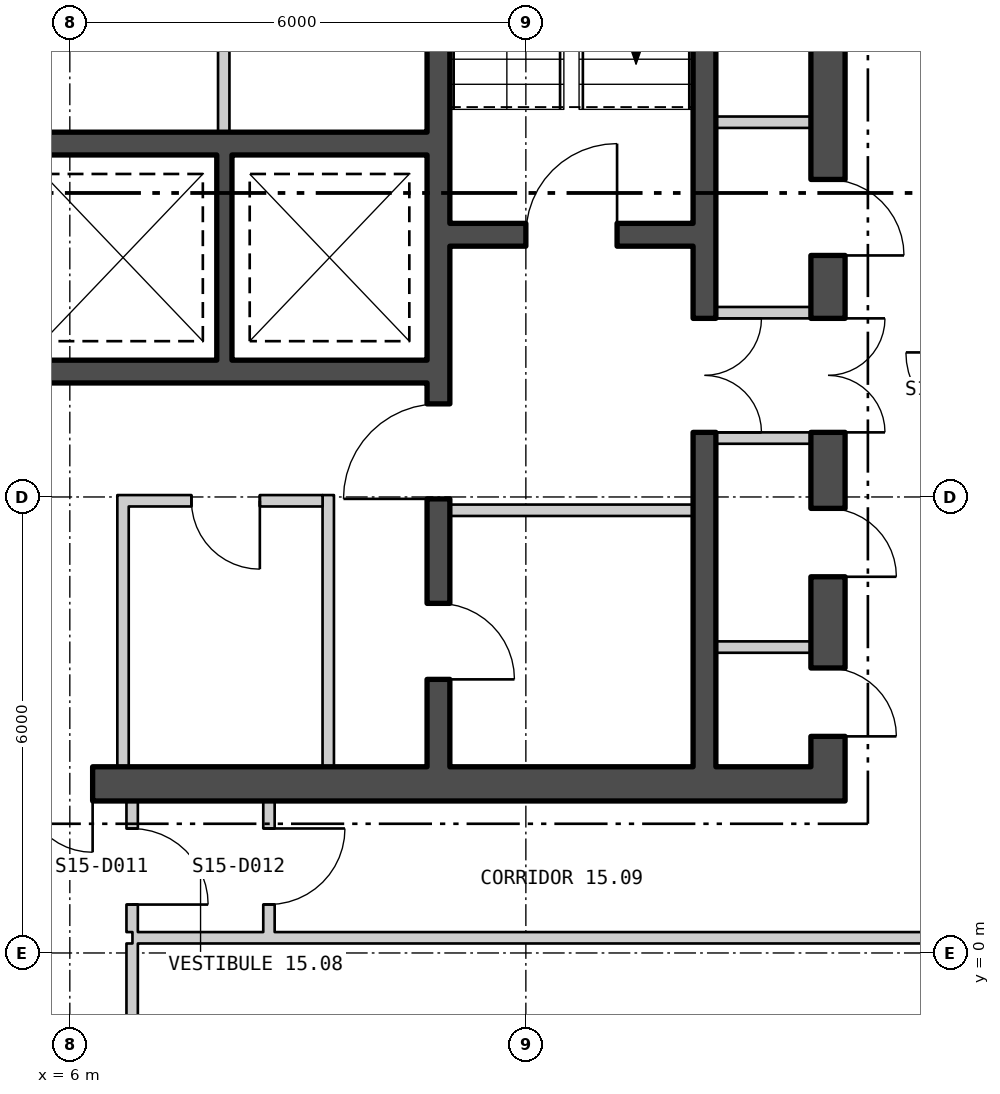
"""IFC4 building model, lengths in metres.
Left out: names, types, materials, properties, quantities, classifications, styles, units other than length and angle.
Written with IfcOpenShell. Run it as: python <this file> out.ifc"""

import sys

from ifc_helpers import new_model, si_unit, direction, frame, frame_2d, origin, place, context, subcontext, project, spatial, polyline, rectangle, outline, extrude, element, fill, save


model = new_model("IFC4")
c1 = context("Model", 3, precision=1e-05, world=origin(), true_north=direction((0.0, 1.0)))
c2 = subcontext(c1, "Body", "Model", "MODEL_VIEW")
j1 = project(units=[si_unit("LENGTHUNIT", "METRE"), si_unit("PLANEANGLEUNIT", "RADIAN")], contexts=[c1])
p1 = place(None, origin())
s1 = spatial("IfcSite", under=j1, at=p1, CompositionType="ELEMENT")
p2 = place(p1, origin())
s2 = spatial("IfcBuilding", under=s1, at=p2, CompositionType="ELEMENT")
p3 = place(p2, frame((0.0, 0.0, 204.3)))
s3 = spatial("IfcBuildingStorey", under=s2, at=p3, CompositionType="ELEMENT", Elevation=204.3)
p4 = place(p3, frame((3.515, -25.726, -0.18), z_axis=(0.0, 0.0, 1.0), x_axis=(0.499999764979, 0.866025539474, 0.0)))
e1 = element("IfcWall", 1, at=p4, inside=s3, PredefinedType="SOLIDWALL", context=c2, shape_type="SweptSolid", body=[
    extrude(outline(polyline([(-0.13, -0.225), (45.87, -0.225), (45.61, 0.225), (0.13, 0.225), (-0.13, -0.225)])), origin(), (0.0, 0.0, 1.0), 3.68),
])
p5 = place(p4, frame((1.424, 0.0, 1.08)))
e2 = element("IfcOpeningElement", 2, at=p5, cuts=e1, PredefinedType="OPENING", context=c2, shape_type="SweptSolid", body=[
    extrude(rectangle(XDim=2.4, YDim=2.0, at=frame_2d((1.2, 1.0))), frame((0.0, 0.235, 0.0), z_axis=(0.0, -1.0, 0.0), x_axis=(1.0, 0.0, 0.0)), (0.0, 0.0, 1.0), 0.47),
])
p6 = place(p4, frame((5.893, 0.0, 1.08)))
e3 = element("IfcOpeningElement", 3, at=p6, cuts=e1, PredefinedType="OPENING", context=c2, shape_type="SweptSolid", body=[
    extrude(rectangle(XDim=2.4, YDim=2.0, at=frame_2d((1.2, 1.0))), frame((0.0, 0.235, 0.0), z_axis=(0.0, -1.0, 0.0), x_axis=(1.0, 0.0, 0.0)), (0.0, 0.0, 1.0), 0.47),
])
p7 = place(p4, frame((10.401, 0.0, 1.08)))
e4 = element("IfcOpeningElement", 4, at=p7, cuts=e1, PredefinedType="OPENING", context=c2, shape_type="SweptSolid", body=[
    extrude(rectangle(XDim=2.4, YDim=2.0, at=frame_2d((1.2, 1.0))), frame((0.0, 0.235, 0.0), z_axis=(0.0, -1.0, 0.0), x_axis=(1.0, 0.0, 0.0)), (0.0, 0.0, 1.0), 0.47),
])
p8 = place(p4, frame((14.909, 0.0, 1.08)))
e5 = element("IfcOpeningElement", 5, at=p8, cuts=e1, PredefinedType="OPENING", context=c2, shape_type="SweptSolid", body=[
    extrude(rectangle(XDim=2.4, YDim=2.0, at=frame_2d((1.2, 1.0))), frame((0.0, 0.235, 0.0), z_axis=(0.0, -1.0, 0.0), x_axis=(1.0, 0.0, 0.0)), (0.0, 0.0, 1.0), 0.47),
])
p9 = place(p4, frame((19.416, 0.0, 1.08)))
e6 = element("IfcOpeningElement", 6, at=p9, cuts=e1, PredefinedType="OPENING", context=c2, shape_type="SweptSolid", body=[
    extrude(rectangle(XDim=2.4, YDim=2.0, at=frame_2d((1.2, 1.0))), frame((0.0, 0.235, 0.0), z_axis=(0.0, -1.0, 0.0), x_axis=(1.0, 0.0, 0.0)), (0.0, 0.0, 1.0), 0.47),
])
p10 = place(p4, frame((23.924, 0.0, 1.08)))
e7 = element("IfcOpeningElement", 7, at=p10, cuts=e1, PredefinedType="OPENING", context=c2, shape_type="SweptSolid", body=[
    extrude(rectangle(XDim=2.4, YDim=2.0, at=frame_2d((1.2, 1.0))), frame((0.0, 0.235, 0.0), z_axis=(0.0, -1.0, 0.0), x_axis=(1.0, 0.0, 0.0)), (0.0, 0.0, 1.0), 0.47),
])
p11 = place(p4, frame((28.431, 0.0, 1.08)))
e8 = element("IfcOpeningElement", 8, at=p11, cuts=e1, PredefinedType="OPENING", context=c2, shape_type="SweptSolid", body=[
    extrude(rectangle(XDim=2.4, YDim=2.0, at=frame_2d((1.2, 1.0))), frame((0.0, 0.235, 0.0), z_axis=(0.0, -1.0, 0.0), x_axis=(1.0, 0.0, 0.0)), (0.0, 0.0, 1.0), 0.47),
])
p12 = place(p4, frame((32.939, 0.0, 1.08)))
e9 = element("IfcOpeningElement", 9, at=p12, cuts=e1, PredefinedType="OPENING", context=c2, shape_type="SweptSolid", body=[
    extrude(rectangle(XDim=2.4, YDim=2.0, at=frame_2d((1.2, 1.0))), frame((0.0, 0.235, 0.0), z_axis=(0.0, -1.0, 0.0), x_axis=(1.0, 0.0, 0.0)), (0.0, 0.0, 1.0), 0.47),
])
p13 = place(p4, frame((37.447, 0.0, 1.08)))
e10 = element("IfcOpeningElement", 10, at=p13, cuts=e1, PredefinedType="OPENING", context=c2, shape_type="SweptSolid", body=[
    extrude(rectangle(XDim=2.4, YDim=2.0, at=frame_2d((1.2, 1.0))), frame((0.0, 0.235, 0.0), z_axis=(0.0, -1.0, 0.0), x_axis=(1.0, 0.0, 0.0)), (0.0, 0.0, 1.0), 0.47),
])
p14 = place(p4, frame((41.916, 0.0, 1.08)))
e11 = element("IfcOpeningElement", 11, at=p14, cuts=e1, PredefinedType="OPENING", context=c2, shape_type="SweptSolid", body=[
    extrude(rectangle(XDim=2.4, YDim=2.0, at=frame_2d((1.2, 1.0))), frame((0.0, 0.235, 0.0), z_axis=(0.0, -1.0, 0.0), x_axis=(1.0, 0.0, 0.0)), (0.0, 0.0, 1.0), 0.47),
])
p15 = place(p3, frame((-16.2, 2.225, 0.0), z_axis=(0.0, 0.0, 1.0), x_axis=(1.0, 0.0, 0.0)))
e12 = element("IfcWall", 12, at=p15, inside=s3, PredefinedType="SHEAR", context=c2, shape_type="SweptSolid", body=[
    extrude(rectangle(XDim=32.4, YDim=0.45, at=frame_2d((16.2, 0.0))), origin(), (0.0, 0.0, 1.0), 3.7),
])
p16 = place(p15, frame((10.7, 0.0, 0.0)))
e13 = element("IfcOpeningElement", 13, at=p16, cuts=e12, PredefinedType="OPENING", context=c2, shape_type="SweptSolid", body=[
    extrude(rectangle(XDim=1.8, YDim=2.4, at=frame_2d((0.9, 1.2))), frame((0.0, 0.235, 0.0), z_axis=(0.0, -1.0, 0.0), x_axis=(1.0, 0.0, 0.0)), (0.0, 0.0, 1.0), 0.47),
])
p17 = place(p15, frame((20.7, 0.0, 0.0)))
e14 = element("IfcOpeningElement", 14, at=p17, cuts=e12, PredefinedType="OPENING", context=c2, shape_type="SweptSolid", body=[
    extrude(rectangle(XDim=1.8, YDim=2.4, at=frame_2d((0.9, 1.2))), frame((0.0, 0.235, 0.0), z_axis=(0.0, -1.0, 0.0), x_axis=(1.0, 0.0, 0.0)), (0.0, 0.0, 1.0), 0.47),
])
p18 = place(p3, frame((15.975, 2.45, 0.0), z_axis=(0.0, 0.0, 1.0), x_axis=(0.0, 1.0, 0.0)))
e15 = element("IfcWall", 15, at=p18, inside=s3, PredefinedType="SHEAR", context=c2, shape_type="SweptSolid", body=[
    extrude(rectangle(XDim=15.1, YDim=0.45, at=frame_2d((7.55, 0.0))), origin(), (0.0, 0.0, 1.0), 3.7),
])
p19 = place(p18, frame((4.4, 0.0, 0.0)))
e16 = element("IfcOpeningElement", 16, at=p19, cuts=e15, PredefinedType="OPENING", context=c2, shape_type="SweptSolid", body=[
    extrude(rectangle(XDim=1.5, YDim=2.1, at=frame_2d((0.75, 1.05))), frame((0.0, 0.235, 0.0), z_axis=(0.0, -1.0, 0.0), x_axis=(1.0, 0.0, 0.0)), (0.0, 0.0, 1.0), 0.47),
])
p20 = place(p18, frame((0.4, 0.0, 0.0)))
e17 = element("IfcOpeningElement", 17, at=p20, cuts=e15, PredefinedType="OPENING", context=c2, shape_type="SweptSolid", body=[
    extrude(rectangle(XDim=0.9, YDim=2.1, at=frame_2d((0.45, 1.05))), frame((0.0, 0.235, 0.0), z_axis=(0.0, -1.0, 0.0), x_axis=(1.0, 0.0, 0.0)), (0.0, 0.0, 1.0), 0.47),
])
p21 = place(p18, frame((2.5, 0.0, 0.0)))
e18 = element("IfcOpeningElement", 18, at=p21, cuts=e15, PredefinedType="OPENING", context=c2, shape_type="SweptSolid", body=[
    extrude(rectangle(XDim=0.9, YDim=2.1, at=frame_2d((0.45, 1.05))), frame((0.0, 0.235, 0.0), z_axis=(0.0, -1.0, 0.0), x_axis=(1.0, 0.0, 0.0)), (0.0, 0.0, 1.0), 0.47),
])
p22 = place(p18, frame((6.728, 0.0, 0.0)))
e19 = element("IfcOpeningElement", 19, at=p22, cuts=e15, PredefinedType="OPENING", context=c2, shape_type="SweptSolid", body=[
    extrude(rectangle(XDim=1.0, YDim=2.1, at=frame_2d((0.5, 1.05))), frame((0.0, 0.235, 0.0), z_axis=(0.0, -1.0, 0.0), x_axis=(1.0, 0.0, 0.0)), (0.0, 0.0, 1.0), 0.47),
])
p23 = place(p18, frame((10.293, 0.0, 0.0)))
e20 = element("IfcOpeningElement", 20, at=p23, cuts=e15, PredefinedType="OPENING", context=c2, shape_type="SweptSolid", body=[
    extrude(rectangle(XDim=0.9, YDim=2.1, at=frame_2d((0.45, 1.05))), frame((0.0, 0.235, 0.0), z_axis=(0.0, -1.0, 0.0), x_axis=(1.0, 0.0, 0.0)), (0.0, 0.0, 1.0), 0.47),
])
p24 = place(p18, frame((13.64, 0.0, 0.0)))
e21 = element("IfcOpeningElement", 21, at=p24, cuts=e15, PredefinedType="OPENING", context=c2, shape_type="SweptSolid", body=[
    extrude(rectangle(XDim=0.9, YDim=2.1, at=frame_2d((0.45, 1.05))), frame((0.0, 0.235, 0.0), z_axis=(0.0, -1.0, 0.0), x_axis=(1.0, 0.0, 0.0)), (0.0, 0.0, 1.0), 0.47),
])
p25 = place(p3, frame((10.85, 2.45, 0.0), z_axis=(0.0, 0.0, 1.0), x_axis=(0.0, 1.0, 0.0)))
e22 = element("IfcWall", 22, at=p25, inside=s3, PredefinedType="SHEAR", context=c2, shape_type="SweptSolid", body=[
    extrude(rectangle(XDim=15.1, YDim=0.3, at=frame_2d((7.55, 0.0))), origin(), (0.0, 0.0, 1.0), 3.7),
])
p26 = place(p25, frame((3.525, 0.0, 0.0)))
e23 = element("IfcOpeningElement", 23, at=p26, cuts=e22, PredefinedType="OPENING", context=c2, shape_type="SweptSolid", body=[
    extrude(rectangle(XDim=1.25, YDim=2.1, at=frame_2d((0.625, 1.05))), frame((0.0, 0.16, 0.0), z_axis=(0.0, -1.0, 0.0), x_axis=(1.0, 0.0, 0.0)), (0.0, 0.0, 1.0), 0.32),
])
p27 = place(p25, frame((1.15, 0.0, 0.0)))
e24 = element("IfcOpeningElement", 24, at=p27, cuts=e22, PredefinedType="OPENING", context=c2, shape_type="SweptSolid", body=[
    extrude(rectangle(XDim=1.0, YDim=2.1, at=frame_2d((0.5, 1.05))), frame((0.0, 0.16, 0.0), z_axis=(0.0, -1.0, 0.0), x_axis=(1.0, 0.0, 0.0)), (0.0, 0.0, 1.0), 0.32),
])
p28 = place(p3, frame((14.35, 2.45, 0.0), z_axis=(0.0, 0.0, 1.0), x_axis=(0.0, 1.0, 0.0)))
e25 = element("IfcWall", 25, at=p28, inside=s3, PredefinedType="SHEAR", context=c2, shape_type="SweptSolid", body=[
    extrude(rectangle(XDim=15.1, YDim=0.3, at=frame_2d((7.55, 0.0))), origin(), (0.0, 0.0, 1.0), 3.7),
])
p29 = place(p28, frame((4.4, 0.0, 0.0)))
e26 = element("IfcOpeningElement", 26, at=p29, cuts=e25, PredefinedType="OPENING", context=c2, shape_type="SweptSolid", body=[
    extrude(rectangle(XDim=1.5, YDim=2.1, at=frame_2d((0.75, 1.05))), frame((0.0, 0.16, 0.0), z_axis=(0.0, -1.0, 0.0), x_axis=(1.0, 0.0, 0.0)), (0.0, 0.0, 1.0), 0.32),
])
p30 = place(p3, frame((11.0, 9.45, 0.0), z_axis=(0.0, 0.0, 1.0), x_axis=(1.0, 0.0, 0.0)))
e27 = element("IfcWall", 27, at=p30, inside=s3, PredefinedType="SHEAR", context=c2, shape_type="SweptSolid", body=[
    extrude(rectangle(XDim=3.2, YDim=0.3, at=frame_2d((1.6, 0.0))), origin(), (0.0, 0.0, 1.0), 3.7),
])
p31 = place(p30, frame((1.0, 0.0, 0.0)))
e28 = element("IfcOpeningElement", 28, at=p31, cuts=e27, PredefinedType="OPENING", context=c2, shape_type="SweptSolid", body=[
    extrude(rectangle(XDim=1.2, YDim=2.1, at=frame_2d((0.6, 1.05))), frame((0.0, 0.16, 0.0), z_axis=(0.0, -1.0, 0.0), x_axis=(1.0, 0.0, 0.0)), (0.0, 0.0, 1.0), 0.32),
])
p32 = place(p3, frame((2.6, 10.65, 0.0), z_axis=(0.0, 0.0, 1.0), x_axis=(1.0, 0.0, 0.0)))
e29 = element("IfcWall", 29, at=p32, inside=s3, PredefinedType="SHEAR", context=c2, shape_type="SweptSolid", body=[
    extrude(rectangle(XDim=8.1, YDim=0.3, at=frame_2d((4.05, 0.0))), origin(), (0.0, 0.0, 1.0), 3.7),
])
p33 = place(p32, frame((0.933, 0.0, 0.0)))
e30 = element("IfcOpeningElement", 30, at=p33, cuts=e29, PredefinedType="OPENING", context=c2, shape_type="SweptSolid", body=[
    extrude(rectangle(XDim=1.0, YDim=2.1, at=frame_2d((0.5, 1.05))), frame((0.0, 0.16, 0.0), z_axis=(0.0, -1.0, 0.0), x_axis=(1.0, 0.0, 0.0)), (0.0, 0.0, 1.0), 0.32),
])
p34 = place(p3, frame((2.6, 7.65, 0.0), z_axis=(0.0, 0.0, 1.0), x_axis=(1.0, 0.0, 0.0)))
e31 = element("IfcWall", 31, at=p34, inside=s3, PredefinedType="SHEAR", context=c2, shape_type="SweptSolid", body=[
    extrude(rectangle(XDim=8.1, YDim=0.3, at=frame_2d((4.05, 0.0))), origin(), (0.0, 0.0, 1.0), 3.7),
])
p35 = place(p3, frame((8.033, 7.8, 0.0), z_axis=(0.0, 0.0, 1.0), x_axis=(0.0, 1.0, 0.0)))
e32 = element("IfcWall", 32, at=p35, inside=s3, PredefinedType="SHEAR", context=c2, shape_type="SweptSolid", body=[
    extrude(rectangle(XDim=2.7, YDim=0.2, at=frame_2d((1.35, 0.0))), origin(), (0.0, 0.0, 1.0), 3.7),
])
p36 = place(p3, frame((8.025, 10.8, 0.0), z_axis=(0.0, 0.0, 1.0), x_axis=(0.0, 1.0, 0.0)))
e33 = element("IfcWall", 33, at=p36, inside=s3, PredefinedType="PARTITIONING", context=c2, shape_type="SweptSolid", body=[
    extrude(rectangle(XDim=3.6, YDim=0.15, at=frame_2d((1.8, 0.0))), origin(), (0.0, 0.0, 1.0), 3.7),
])
p37 = place(p36, frame((1.175, 0.0, 0.0)))
e34 = element("IfcOpeningElement", 34, at=p37, cuts=e33, PredefinedType="OPENING", context=c2, shape_type="SweptSolid", body=[
    extrude(rectangle(XDim=1.25, YDim=2.1, at=frame_2d((0.625, 1.05))), frame((0.0, 0.085, 0.0), z_axis=(0.0, -1.0, 0.0), x_axis=(1.0, 0.0, 0.0)), (0.0, 0.0, 1.0), 0.17),
])
p38 = place(p3, frame((11.0, 5.825, 0.0), z_axis=(0.0, 0.0, 1.0), x_axis=(1.0, 0.0, 0.0)))
e35 = element("IfcWall", 35, at=p38, inside=s3, PredefinedType="PARTITIONING", context=c2, shape_type="SweptSolid", body=[
    extrude(rectangle(XDim=3.2, YDim=0.15, at=frame_2d((1.6, 0.0))), origin(), (0.0, 0.0, 1.0), 3.7),
])
for number, where, z_axis, x_axis in (
    (36, (14.5, 6.775, 0.0), (0.0, 0.0, 1.0), (1.0, 0.0, 0.0)),
    (37, (14.5, 8.425, 0.0), (0.0, 0.0, 1.0), (1.0, 0.0, 0.0)),
    (38, (14.5, 4.025, 0.0), (0.0, 0.0, 1.0), (1.0, 0.0, 0.0)),
    (39, (14.5, 10.931, 0.0), (0.0, 0.0, 1.0), (1.0, 0.0, 0.0)),
):
    element("IfcWall", number, at=place(p3, frame(where, z_axis=z_axis, x_axis=x_axis)), inside=s3, PredefinedType="PARTITIONING", context=c2, shape_type="SweptSolid", body=[
        extrude(rectangle(XDim=1.25, YDim=0.15, at=frame_2d((0.625, 0.0))), origin(), (0.0, 0.0, 1.0), 3.7),
    ])
for number, where, z_axis, x_axis in (
    (40, (6.7, 2.45, 0.0), (0.0, 0.0, 1.0), (0.0, 1.0, 0.0)),
    (41, (9.4, 2.45, 0.0), (0.0, 0.0, 1.0), (0.0, 1.0, 0.0)),
):
    element("IfcWall", number, at=place(p3, frame(where, z_axis=z_axis, x_axis=x_axis)), inside=s3, PredefinedType="PARTITIONING", context=c2, shape_type="SweptSolid", body=[
        extrude(rectangle(XDim=3.575, YDim=0.15, at=frame_2d((1.788, 0.0))), origin(), (0.0, 0.0, 1.0), 3.7),
    ])
p39 = place(p3, frame((6.775, 5.95, 0.0), z_axis=(0.0, 0.0, 1.0), x_axis=(1.0, 0.0, 0.0)))
e42 = element("IfcWall", 42, at=p39, inside=s3, PredefinedType="PARTITIONING", context=c2, shape_type="SweptSolid", body=[
    extrude(rectangle(XDim=2.55, YDim=0.15, at=frame_2d((1.275, 0.0))), origin(), (0.0, 0.0, 1.0), 3.7),
])
p40 = place(p39, frame((0.825, 0.0, 0.0)))
e43 = element("IfcOpeningElement", 43, at=p40, cuts=e42, PredefinedType="OPENING", context=c2, shape_type="SweptSolid", body=[
    extrude(rectangle(XDim=0.9, YDim=2.1, at=frame_2d((0.45, 1.05))), frame((0.0, 0.085, 0.0), z_axis=(0.0, -1.0, 0.0), x_axis=(1.0, 0.0, 0.0)), (0.0, 0.0, 1.0), 0.17),
])
p41 = place(p3, frame((6.82, -1.125, 0.0), z_axis=(0.0, 0.0, 1.0), x_axis=(0.0, 1.0, 0.0)))
e44 = element("IfcWall", 44, at=p41, inside=s3, PredefinedType="PARTITIONING", context=c2, shape_type="SweptSolid", body=[
    extrude(rectangle(XDim=1.25, YDim=0.15, at=frame_2d((0.625, 0.0))), origin(), (0.0, 0.0, 1.0), 3.7),
])
p42 = place(p3, frame((6.82, 0.275, 0.0), z_axis=(0.0, 0.0, 1.0), x_axis=(0.0, 1.0, 0.0)))
e45 = element("IfcWall", 45, at=p42, inside=s3, PredefinedType="PARTITIONING", context=c2, shape_type="SweptSolid", body=[
    extrude(rectangle(XDim=1.725, YDim=0.15, at=frame_2d((0.863, 0.0))), origin(), (0.0, 0.0, 1.0), 3.7),
])
p43 = place(p42, frame((0.362, 0.0, 0.0)))
e46 = element("IfcOpeningElement", 46, at=p43, cuts=e45, PredefinedType="OPENING", context=c2, shape_type="SweptSolid", body=[
    extrude(rectangle(XDim=1.0, YDim=2.1, at=frame_2d((0.5, 1.05))), frame((0.0, 0.085, 0.0), z_axis=(0.0, -1.0, 0.0), x_axis=(1.0, 0.0, 0.0)), (0.0, 0.0, 1.0), 0.17),
])
p44 = place(p3, frame((6.824, 0.2, 0.0), z_axis=(0.0, 0.0, 1.0), x_axis=(1.0, 0.0, 0.0)))
e47 = element("IfcWall", 47, at=p44, inside=s3, PredefinedType="PARTITIONING", context=c2, shape_type="SweptSolid", body=[
    extrude(rectangle(XDim=11.101, YDim=0.15, at=frame_2d((5.551, 0.0))), origin(), (0.0, 0.0, 1.0), 3.7),
])
p45 = place(p3, frame((8.62, 0.275, 0.0), z_axis=(0.0, 0.0, 1.0), x_axis=(0.0, 1.0, 0.0)))
e48 = element("IfcWall", 48, at=p45, inside=s3, PredefinedType="PARTITIONING", context=c2, shape_type="SweptSolid", body=[
    extrude(rectangle(XDim=1.725, YDim=0.15, at=frame_2d((0.863, 0.0))), origin(), (0.0, 0.0, 1.0), 3.7),
])
p46 = place(p45, frame((0.363, 0.0, 0.0)))
e49 = element("IfcOpeningElement", 49, at=p46, cuts=e48, PredefinedType="OPENING", context=c2, shape_type="SweptSolid", body=[
    extrude(rectangle(XDim=1.0, YDim=2.1, at=frame_2d((0.5, 1.05))), frame((0.0, 0.085, 0.0), z_axis=(0.0, -1.0, 0.0), x_axis=(1.0, 0.0, 0.0)), (0.0, 0.0, 1.0), 0.17),
])
p47 = place(p31, origin())
e50 = element("IfcDoor", 50, at=p47, inside=s3, OperationType="SINGLE_SWING_LEFT", PredefinedType="DOOR", context=c2, shape_type="SweptSolid", body=[
    extrude(rectangle(XDim=1.2, YDim=2.1, at=frame_2d((0.6, 1.05))), frame((0.0, 0.025, 0.0), z_axis=(0.0, -1.0, 0.0), x_axis=(1.0, 0.0, 0.0)), (0.0, 0.0, 1.0), 0.05),
])
fill(e28, e50)
p48 = place(p26, origin())
e51 = element("IfcDoor", 51, at=p48, inside=s3, OperationType="SINGLE_SWING_RIGHT", PredefinedType="DOOR", context=c2, shape_type="SweptSolid", body=[
    extrude(rectangle(XDim=1.25, YDim=2.1, at=frame_2d((0.625, 1.05))), frame((0.0, 0.025, 0.0), z_axis=(0.0, -1.0, 0.0), x_axis=(1.0, 0.0, 0.0)), (0.0, 0.0, 1.0), 0.05),
])
fill(e23, e51)
p49 = place(p27, origin())
e52 = element("IfcDoor", 52, at=p49, inside=s3, OperationType="SINGLE_SWING_LEFT", PredefinedType="DOOR", context=c2, shape_type="SweptSolid", body=[
    extrude(rectangle(XDim=1.0, YDim=2.1, at=frame_2d((0.5, 1.05))), frame((0.0, 0.025, 0.0), z_axis=(0.0, -1.0, 0.0), x_axis=(1.0, 0.0, 0.0)), (0.0, 0.0, 1.0), 0.05),
])
fill(e24, e52)
p50 = place(p29, origin())
e53 = element("IfcDoor", 53, at=p50, inside=s3, OperationType="DOUBLE_DOOR_SINGLE_SWING", PredefinedType="DOOR", context=c2, shape_type="SweptSolid", body=[
    extrude(rectangle(XDim=1.5, YDim=2.1, at=frame_2d((0.75, 1.05))), frame((0.0, 0.025, 0.0), z_axis=(0.0, -1.0, 0.0), x_axis=(1.0, 0.0, 0.0)), (0.0, 0.0, 1.0), 0.05),
])
fill(e26, e53)
p51 = place(p19, origin())
e54 = element("IfcDoor", 54, at=p51, inside=s3, OperationType="DOUBLE_DOOR_SINGLE_SWING", PredefinedType="DOOR", context=c2, shape_type="SweptSolid", body=[
    extrude(rectangle(XDim=1.5, YDim=2.1, at=frame_2d((0.75, 1.05))), frame((0.0, 0.025, 0.0), z_axis=(0.0, -1.0, 0.0), x_axis=(1.0, 0.0, 0.0)), (0.0, 0.0, 1.0), 0.05),
])
fill(e16, e54)
p52 = place(p20, origin())
e55 = element("IfcDoor", 55, at=p52, inside=s3, OperationType="SINGLE_SWING_LEFT", PredefinedType="DOOR", context=c2, shape_type="SweptSolid", body=[
    extrude(rectangle(XDim=0.9, YDim=2.1, at=frame_2d((0.45, 1.05))), frame((0.0, 0.025, 0.0), z_axis=(0.0, -1.0, 0.0), x_axis=(1.0, 0.0, 0.0)), (0.0, 0.0, 1.0), 0.05),
])
fill(e17, e55)
p53 = place(p21, origin())
e56 = element("IfcDoor", 56, at=p53, inside=s3, OperationType="SINGLE_SWING_LEFT", PredefinedType="DOOR", context=c2, shape_type="SweptSolid", body=[
    extrude(rectangle(XDim=0.9, YDim=2.1, at=frame_2d((0.45, 1.05))), frame((0.0, 0.025, 0.0), z_axis=(0.0, -1.0, 0.0), x_axis=(1.0, 0.0, 0.0)), (0.0, 0.0, 1.0), 0.05),
])
fill(e18, e56)
p54 = place(p22, origin())
e57 = element("IfcDoor", 57, at=p54, inside=s3, OperationType="SINGLE_SWING_LEFT", PredefinedType="DOOR", context=c2, shape_type="SweptSolid", body=[
    extrude(rectangle(XDim=1.0, YDim=2.1, at=frame_2d((0.5, 1.05))), frame((0.0, 0.025, 0.0), z_axis=(0.0, -1.0, 0.0), x_axis=(1.0, 0.0, 0.0)), (0.0, 0.0, 1.0), 0.05),
])
fill(e19, e57)
p55 = place(p40, origin())
e58 = element("IfcDoor", 58, at=p55, inside=s3, OperationType="SINGLE_SWING_RIGHT", PredefinedType="DOOR", context=c2, shape_type="SweptSolid", body=[
    extrude(rectangle(XDim=0.9, YDim=2.1, at=frame_2d((0.45, 1.05))), frame((0.0, 0.025, 0.0), z_axis=(0.0, -1.0, 0.0), x_axis=(1.0, 0.0, 0.0)), (0.0, 0.0, 1.0), 0.05),
])
fill(e43, e58)
p56 = place(p17, origin())
e59 = element("IfcDoor", 59, at=p56, inside=s3, OperationType="DOUBLE_DOOR_SINGLE_SWING", PredefinedType="DOOR", context=c2, shape_type="SweptSolid", body=[
    extrude(rectangle(XDim=1.8, YDim=2.4, at=frame_2d((0.9, 1.2))), frame((0.0, 0.025, 0.0), z_axis=(0.0, -1.0, 0.0), x_axis=(1.0, 0.0, 0.0)), (0.0, 0.0, 1.0), 0.05),
])
fill(e14, e59)
p57 = place(p43, origin())
e60 = element("IfcDoor", 60, at=p57, inside=s3, OperationType="SINGLE_SWING_LEFT", PredefinedType="DOOR", context=c2, shape_type="SweptSolid", body=[
    extrude(rectangle(XDim=1.0, YDim=2.1, at=frame_2d((0.5, 1.05))), frame((0.0, 0.025, 0.0), z_axis=(0.0, -1.0, 0.0), x_axis=(1.0, 0.0, 0.0)), (0.0, 0.0, 1.0), 0.05),
])
fill(e46, e60)
p58 = place(p46, origin())
e61 = element("IfcDoor", 61, at=p58, inside=s3, OperationType="SINGLE_SWING_RIGHT", PredefinedType="DOOR", context=c2, shape_type="SweptSolid", body=[
    extrude(rectangle(XDim=1.0, YDim=2.1, at=frame_2d((0.5, 1.05))), frame((0.0, 0.025, 0.0), z_axis=(0.0, -1.0, 0.0), x_axis=(1.0, 0.0, 0.0)), (0.0, 0.0, 1.0), 0.05),
])
fill(e49, e61)
save(model, sys.argv[1])
